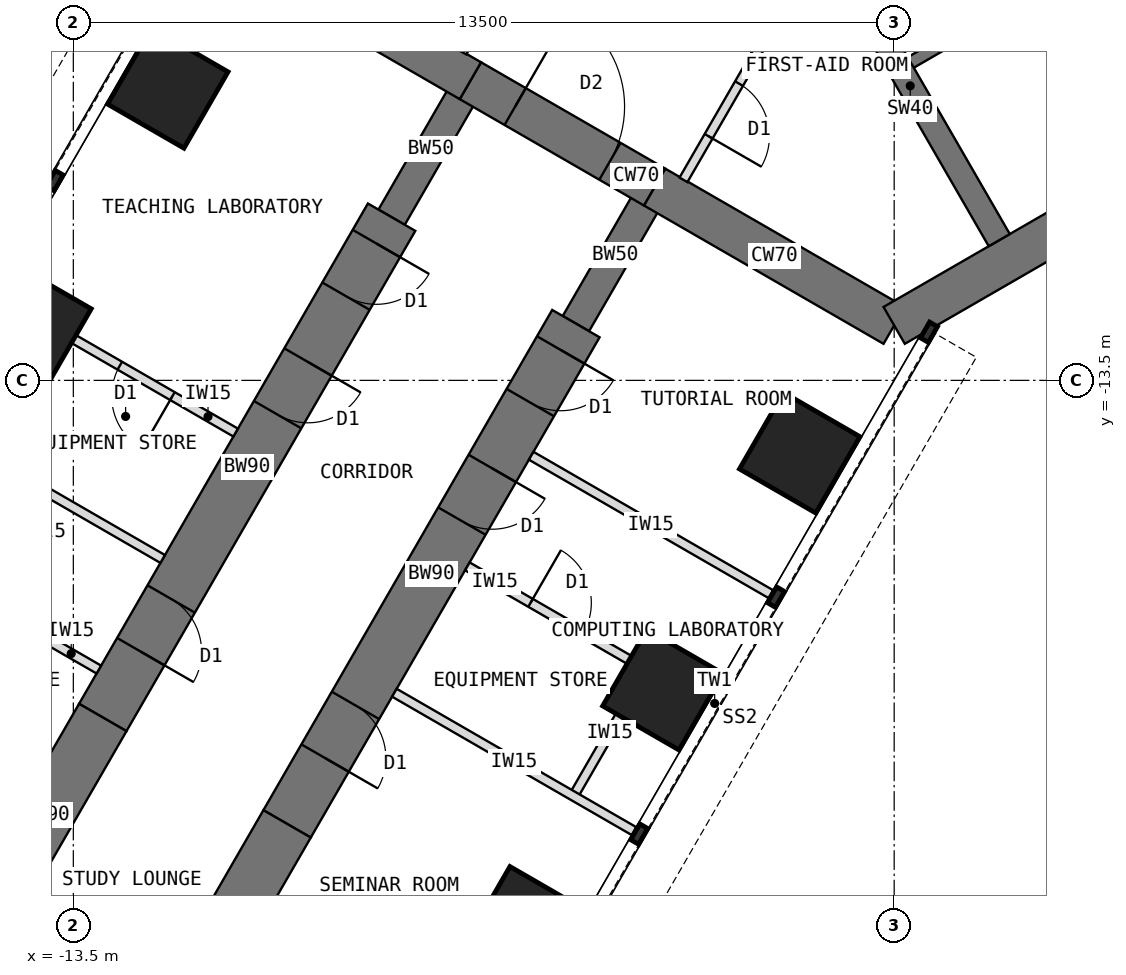
"""IFC4 building model, lengths in metres.
Left out: names, types, materials, properties, quantities, classifications, styles, units other than length and angle.
Written with IfcOpenShell. Run it as: python <this file> out.ifc"""

import sys

from ifc_helpers import new_model, si_unit, direction, frame, frame_2d, origin, origin_2d, place, context, subcontext, project, spatial, rectangle, extrude, element, fill, save


model = new_model("IFC4")
c1 = context("Model", 3, precision=1e-05, world=origin(), true_north=direction((0.0, 1.0)))
c2 = subcontext(c1, "Body", "Model", "MODEL_VIEW")
j1 = project(units=[si_unit("LENGTHUNIT", "METRE"), si_unit("PLANEANGLEUNIT", "RADIAN")], contexts=[c1])
p1 = place(None, origin())
s1 = spatial("IfcSite", under=j1, at=p1, CompositionType="ELEMENT")
p2 = place(p1, origin())
s2 = spatial("IfcBuilding", under=s1, at=p2, CompositionType="ELEMENT")
p3 = place(p2, frame((0.0, 0.0, 64.5)))
s3 = spatial("IfcBuildingStorey", under=s2, at=p3, CompositionType="ELEMENT", Elevation=64.5)
p4 = place(p3, frame((-10.908, -6.298, 0.0), z_axis=(0.0, 0.0, 1.0), x_axis=(0.866034513004, -0.499984222037, 0.0)))
e1 = element("IfcWall", 1, at=p4, inside=s3, PredefinedType="SHEAR", context=c2, shape_type="SweptSolid", body=[
    extrude(rectangle(XDim=4.548, YDim=0.7, at=frame_2d((2.274, 0.0))), origin(), (0.0, 0.0, 1.0), 4.0),
])
p5 = place(p3, frame((-6.97, -8.572, 0.0), z_axis=(0.0, 0.0, 1.0), x_axis=(0.866019471182, -0.500010275428, 0.0)))
e2 = element("IfcWall", 2, at=p5, inside=s3, PredefinedType="SHEAR", context=c2, shape_type="SweptSolid", body=[
    extrude(rectangle(XDim=3.5, YDim=0.7, at=frame_2d((1.75, 0.0))), origin(), (0.0, 0.0, 1.0), 4.0),
])
p6 = place(p5, frame((0.85, 0.0, 0.0)))
e3 = element("IfcOpeningElement", 3, at=p6, cuts=e2, PredefinedType="OPENING", context=c2, shape_type="SweptSolid", body=[
    extrude(rectangle(XDim=1.8, YDim=2.1, at=frame_2d((0.9, 1.05))), frame((0.0, 0.36, 0.0), z_axis=(0.0, -1.0, 0.0), x_axis=(1.0, 0.0, 0.0)), (0.0, 0.0, 1.0), 0.72),
])
p7 = place(p3, frame((-3.939, -10.322, 0.0), z_axis=(0.0, 0.0, 1.0), x_axis=(0.866011268655, -0.500024481964, 0.0)))
e4 = element("IfcWall", 4, at=p7, inside=s3, PredefinedType="SHEAR", context=c2, shape_type="SweptSolid", body=[
    extrude(rectangle(XDim=4.548, YDim=0.7, at=frame_2d((2.274, 0.0))), origin(), (0.0, 0.0, 1.0), 4.0),
])
p8 = place(p3, frame((0.0, -12.596, 0.0), z_axis=(0.0, 0.0, 1.0), x_axis=(0.866021940709, 0.500005998175, 0.0)))
e5 = element("IfcWall", 5, at=p8, inside=s3, PredefinedType="SHEAR", context=c2, shape_type="SweptSolid", body=[
    extrude(rectangle(XDim=12.596, YDim=0.7, at=frame_2d((6.298, 0.0))), origin(), (0.0, 0.0, 1.0), 4.0),
])
p9 = place(p3, frame((-3.939, -10.322, 0.0), z_axis=(0.0, 0.0, 1.0), x_axis=(-0.499918158782, -0.866072649678, 0.0)))
e6 = element("IfcWall", 6, at=p9, inside=s3, PredefinedType="SHEAR", context=c2, shape_type="SweptSolid", body=[
    extrude(rectangle(XDim=2.592, YDim=0.5, at=frame_2d((1.296, 0.0))), origin(), (0.0, 0.0, 1.0), 4.0),
])
p10 = place(p3, frame((-5.234, -12.566, 0.0), z_axis=(0.0, 0.0, 1.0), x_axis=(-0.499997557548, -0.86602681393, 0.0)))
e7 = element("IfcWall", 7, at=p10, inside=s3, PredefinedType="SHEAR", context=c2, shape_type="SweptSolid", body=[
    extrude(rectangle(XDim=9.5, YDim=0.9, at=frame_2d((4.75, 0.0))), origin(), (0.0, 0.0, 1.0), 4.0),
])
p11 = place(p10, frame((0.5, 0.0, 0.0)))
e8 = element("IfcOpeningElement", 8, at=p11, cuts=e7, PredefinedType="OPENING", context=c2, shape_type="SweptSolid", body=[
    extrude(rectangle(XDim=1.0, YDim=2.1, at=frame_2d((0.5, 1.05))), frame((0.0, 0.46, 0.0), z_axis=(0.0, -1.0, 0.0), x_axis=(1.0, 0.0, 0.0)), (0.0, 0.0, 1.0), 0.92),
])
p12 = place(p10, frame((2.75, 0.0, 0.0)))
e9 = element("IfcOpeningElement", 9, at=p12, cuts=e7, PredefinedType="OPENING", context=c2, shape_type="SweptSolid", body=[
    extrude(rectangle(XDim=1.0, YDim=2.1, at=frame_2d((0.5, 1.05))), frame((0.0, 0.46, 0.0), z_axis=(0.0, -1.0, 0.0), x_axis=(1.0, 0.0, 0.0)), (0.0, 0.0, 1.0), 0.92),
])
p13 = place(p10, frame((7.25, 0.0, 0.0)))
e10 = element("IfcOpeningElement", 10, at=p13, cuts=e7, PredefinedType="OPENING", context=c2, shape_type="SweptSolid", body=[
    extrude(rectangle(XDim=1.0, YDim=2.1, at=frame_2d((0.5, 1.05))), frame((0.0, 0.46, 0.0), z_axis=(0.0, -1.0, 0.0), x_axis=(1.0, 0.0, 0.0)), (0.0, 0.0, 1.0), 0.92),
])
p14 = place(p3, frame((-9.984, -20.794, 0.0), z_axis=(0.0, 0.0, 1.0), x_axis=(-0.500042316284, -0.866000971088, 0.0)))
e11 = element("IfcWall", 11, at=p14, inside=s3, PredefinedType="SHEAR", context=c2, shape_type="SweptSolid", body=[
    extrude(rectangle(XDim=3.7, YDim=0.9, at=frame_2d((1.85, 0.0))), origin(), (0.0, 0.0, 1.0), 4.0),
])
p15 = place(p3, frame((-6.97, -8.572, 0.0), z_axis=(0.0, 0.0, 1.0), x_axis=(-0.499988811324, -0.866031863473, 0.0)))
e12 = element("IfcWall", 12, at=p15, inside=s3, PredefinedType="SHEAR", context=c2, shape_type="SweptSolid", body=[
    extrude(rectangle(XDim=2.592, YDim=0.5, at=frame_2d((1.296, 0.0))), origin(), (0.0, 0.0, 1.0), 4.0),
])
p16 = place(p3, frame((-8.266, -10.816, 0.0), z_axis=(0.0, 0.0, 1.0), x_axis=(-0.499997557548, -0.86602681393, 0.0)))
e13 = element("IfcWall", 13, at=p16, inside=s3, PredefinedType="SHEAR", context=c2, shape_type="SweptSolid", body=[
    extrude(rectangle(XDim=9.5, YDim=0.9, at=frame_2d((4.75, 0.0))), origin(), (0.0, 0.0, 1.0), 4.0),
])
p17 = place(p16, frame((0.5, 0.0, 0.0)))
e14 = element("IfcOpeningElement", 14, at=p17, cuts=e13, PredefinedType="OPENING", context=c2, shape_type="SweptSolid", body=[
    extrude(rectangle(XDim=1.0, YDim=2.1, at=frame_2d((0.5, 1.05))), frame((0.0, 0.46, 0.0), z_axis=(0.0, -1.0, 0.0), x_axis=(1.0, 0.0, 0.0)), (0.0, 0.0, 1.0), 0.92),
])
p18 = place(p16, frame((2.75, 0.0, 0.0)))
e15 = element("IfcOpeningElement", 15, at=p18, cuts=e13, PredefinedType="OPENING", context=c2, shape_type="SweptSolid", body=[
    extrude(rectangle(XDim=1.0, YDim=2.1, at=frame_2d((0.5, 1.05))), frame((0.0, 0.46, 0.0), z_axis=(0.0, -1.0, 0.0), x_axis=(1.0, 0.0, 0.0)), (0.0, 0.0, 1.0), 0.92),
])
p19 = place(p16, frame((7.25, 0.0, 0.0)))
e16 = element("IfcOpeningElement", 16, at=p19, cuts=e13, PredefinedType="OPENING", context=c2, shape_type="SweptSolid", body=[
    extrude(rectangle(XDim=1.0, YDim=2.1, at=frame_2d((0.5, 1.05))), frame((0.0, 0.46, 0.0), z_axis=(0.0, -1.0, 0.0), x_axis=(1.0, 0.0, 0.0)), (0.0, 0.0, 1.0), 0.92),
])
p20 = place(p3, frame((-13.016, -19.044, 0.0), z_axis=(0.0, 0.0, 1.0), x_axis=(-0.499992827086, -0.866029545028, 0.0)))
e17 = element("IfcWall", 17, at=p20, inside=s3, PredefinedType="SHEAR", context=c2, shape_type="SweptSolid", body=[
    extrude(rectangle(XDim=3.7, YDim=0.9, at=frame_2d((1.85, 0.0))), origin(), (0.0, 0.0, 1.0), 4.0),
])
for number, where, z_axis, x_axis in (
    (18, (-1.554, -14.691, 0.0), (0.0, 0.0, 1.0), (0.5, 0.866, 0.0)),
    (19, (-11.946, -8.691, 0.0), (0.0, 0.0, 1.0), (0.5, 0.866, 0.0)),
    (20, (-3.804, -18.588, 0.0), (0.0, 0.0, 1.0), (0.5, 0.866, 0.0)),
    (21, (-14.196, -12.588, 0.0), (0.0, 0.0, 1.0), (0.5, 0.866, 0.0)),
    (22, (-6.054, -22.486, 0.0), (0.0, 0.0, 1.0), (0.5, 0.866, 0.0)),
):
    element("IfcColumn", number, at=place(p3, frame(where, z_axis=z_axis, x_axis=x_axis)), inside=s3, PredefinedType="COLUMN", context=c2, shape_type="SweptSolid", body=[
        extrude(rectangle(XDim=1.45, YDim=1.45, at=origin_2d()), origin(), (0.0, 0.0, 1.0), 4.0),
    ])
p21 = place(p3, frame((0.186, -8.322, 0.0), z_axis=(0.0, 0.0, 1.0), x_axis=(0.866026010844, 0.49999894854, 0.0)))
e23 = element("IfcWall", 23, at=p21, inside=s3, PredefinedType="SHEAR", context=c2, shape_type="SweptSolid", body=[
    extrude(rectangle(XDim=8.0, YDim=0.2, at=frame_2d((4.0, 0.0))), origin(), (0.0, 0.0, 1.0), 4.0),
])
p22 = place(p21, frame((6.7, 0.0, 0.0)))
e24 = element("IfcOpeningElement", 24, at=p22, cuts=e23, PredefinedType="OPENING", context=c2, shape_type="SweptSolid", body=[
    extrude(rectangle(XDim=1.1, YDim=2.1, at=frame_2d((0.55, 1.05))), frame((0.0, 0.11, 0.0), z_axis=(0.0, -1.0, 0.0), x_axis=(1.0, 0.0, 0.0)), (0.0, 0.0, 1.0), 0.22),
])
p23 = place(p3, frame((-1.201, -6.12, 0.0), z_axis=(0.0, 0.0, 1.0), x_axis=(0.500002627198, -0.866023886965, 0.0)))
e25 = element("IfcWall", 25, at=p23, inside=s3, PredefinedType="SHEAR", context=c2, shape_type="SweptSolid", body=[
    extrude(rectangle(XDim=5.858, YDim=0.4, at=frame_2d((2.929, 0.0))), origin(), (0.0, 0.0, 1.0), 4.0),
])
for number, where, z_axis, x_axis in (
    (26, (-5.97, -14.74, 0.0), (0.0, 0.0, 1.0), (0.866, -0.5, 0.0)),
    (27, (-8.22, -18.637, 0.0), (0.0, 0.0, 1.0), (0.866, -0.5, 0.0)),
):
    element("IfcWall", number, at=place(p3, frame(where, z_axis=z_axis, x_axis=x_axis)), inside=s3, PredefinedType="PARTITIONING", context=c2, shape_type="SweptSolid", body=[
        extrude(rectangle(XDim=4.55, YDim=0.15, at=frame_2d((2.275, 0.0))), origin(), (0.0, 0.0, 1.0), 3.8),
    ])
p24 = place(p3, frame((-4.075, -18.259, 0.0), z_axis=(0.0, 0.0, 1.0), x_axis=(-0.500001309137, -0.866024647952, 0.0)))
e28 = element("IfcWall", 28, at=p24, inside=s3, PredefinedType="PARTITIONING", context=c2, shape_type="SweptSolid", body=[
    extrude(rectangle(XDim=2.4, YDim=0.15, at=frame_2d((1.2, 0.0))), origin(), (0.0, 0.0, 1.0), 3.8),
])
p25 = place(p3, frame((-7.02, -16.559, 0.0), z_axis=(0.0, 0.0, 1.0), x_axis=(0.866038511948, -0.499977295307, 0.0)))
e29 = element("IfcWall", 29, at=p25, inside=s3, PredefinedType="PARTITIONING", context=c2, shape_type="SweptSolid", body=[
    extrude(rectangle(XDim=3.4, YDim=0.15, at=frame_2d((1.7, 0.0))), origin(), (0.0, 0.0, 1.0), 3.8),
])
p26 = place(p25, frame((1.2, 0.0, 0.0)))
e30 = element("IfcOpeningElement", 30, at=p26, cuts=e29, PredefinedType="OPENING", context=c2, shape_type="SweptSolid", body=[
    extrude(rectangle(XDim=1.0, YDim=2.1, at=frame_2d((0.5, 1.05))), frame((0.0, 0.085, 0.0), z_axis=(0.0, -1.0, 0.0), x_axis=(1.0, 0.0, 0.0)), (0.0, 0.0, 1.0), 0.17),
])
p27 = place(p3, frame((-12.03, -16.437, 0.0), z_axis=(0.0, 0.0, 1.0), x_axis=(-0.866035472144, 0.499982560684, 0.0)))
e31 = element("IfcWall", 31, at=p27, inside=s3, PredefinedType="PARTITIONING", context=c2, shape_type="SweptSolid", body=[
    extrude(rectangle(XDim=4.55, YDim=0.15, at=frame_2d((2.275, 0.0))), origin(), (0.0, 0.0, 1.0), 3.8),
])
p28 = place(p3, frame((-13.775, -12.658, 0.0), z_axis=(0.0, 0.0, 1.0), x_axis=(-0.500033551112, -0.866006032174, 0.0)))
e32 = element("IfcWall", 32, at=p28, inside=s3, PredefinedType="PARTITIONING", context=c2, shape_type="SweptSolid", body=[
    extrude(rectangle(XDim=2.4, YDim=0.15, at=frame_2d((1.2, 0.0))), origin(), (0.0, 0.0, 1.0), 3.8),
])
p29 = place(p3, frame((-10.83, -14.359, 0.0), z_axis=(0.0, 0.0, 1.0), x_axis=(-0.865989465428, 0.500062241894, 0.0)))
e33 = element("IfcWall", 33, at=p29, inside=s3, PredefinedType="PARTITIONING", context=c2, shape_type="SweptSolid", body=[
    extrude(rectangle(XDim=3.4, YDim=0.15, at=frame_2d((1.7, 0.0))), origin(), (0.0, 0.0, 1.0), 3.8),
])
p30 = place(p29, frame((1.2, 0.0, 0.0)))
e34 = element("IfcOpeningElement", 34, at=p30, cuts=e33, PredefinedType="OPENING", context=c2, shape_type="SweptSolid", body=[
    extrude(rectangle(XDim=1.0, YDim=2.1, at=frame_2d((0.5, 1.05))), frame((0.0, 0.085, 0.0), z_axis=(0.0, -1.0, 0.0), x_axis=(1.0, 0.0, 0.0)), (0.0, 0.0, 1.0), 0.17),
])
p31 = place(p3, frame((-13.08, -18.256, 0.0), z_axis=(0.0, 0.0, 1.0), x_axis=(-0.866020560687, 0.500008388397, 0.0)))
e35 = element("IfcWall", 35, at=p31, inside=s3, PredefinedType="PARTITIONING", context=c2, shape_type="SweptSolid", body=[
    extrude(rectangle(XDim=3.4, YDim=0.15, at=frame_2d((1.7, 0.0))), origin(), (0.0, 0.0, 1.0), 3.8),
])
p32 = place(p31, frame((1.2, 0.0, 0.0)))
e36 = element("IfcOpeningElement", 36, at=p32, cuts=e35, PredefinedType="OPENING", context=c2, shape_type="SweptSolid", body=[
    extrude(rectangle(XDim=1.0, YDim=2.1, at=frame_2d((0.5, 1.05))), frame((0.0, 0.085, 0.0), z_axis=(0.0, -1.0, 0.0), x_axis=(1.0, 0.0, 0.0)), (0.0, 0.0, 1.0), 0.17),
])
p33 = place(p3, frame((-1.253, -6.37, 0.0), z_axis=(0.0, 0.0, 1.0), x_axis=(-0.500007369519, -0.866021148949, 0.0)))
e37 = element("IfcWall", 37, at=p33, inside=s3, PredefinedType="PARTITIONING", context=c2, shape_type="SweptSolid", body=[
    extrude(rectangle(XDim=4.426, YDim=0.15, at=frame_2d((2.213, 0.0))), origin(), (0.0, 0.0, 1.0), 3.8),
])
p34 = place(p33, frame((2.598, 0.0, 0.0)))
e38 = element("IfcOpeningElement", 38, at=p34, cuts=e37, PredefinedType="OPENING", context=c2, shape_type="SweptSolid", body=[
    extrude(rectangle(XDim=1.0, YDim=2.1, at=frame_2d((0.5, 1.05))), frame((0.0, 0.085, 0.0), z_axis=(0.0, -1.0, 0.0), x_axis=(1.0, 0.0, 0.0)), (0.0, 0.0, 1.0), 0.17),
])
p35 = place(p3, frame((-7.103, -8.103, 0.0), z_axis=(0.0, 0.0, 1.0), x_axis=(0.500007369519, 0.866021148949, 0.0)))
e39 = element("IfcWall", 39, at=p35, inside=s3, PredefinedType="PARTITIONING", context=c2, shape_type="SweptSolid", body=[
    extrude(rectangle(XDim=4.426, YDim=0.15, at=frame_2d((2.213, 0.0))), origin(), (0.0, 0.0, 1.0), 3.8),
])
p36 = place(p35, frame((0.828, 0.0, 0.0)))
e40 = element("IfcOpeningElement", 40, at=p36, cuts=e39, PredefinedType="OPENING", context=c2, shape_type="SweptSolid", body=[
    extrude(rectangle(XDim=1.0, YDim=2.1, at=frame_2d((0.5, 1.05))), frame((0.0, 0.085, 0.0), z_axis=(0.0, -1.0, 0.0), x_axis=(1.0, 0.0, 0.0)), (0.0, 0.0, 1.0), 0.17),
])
p37 = place(p6, origin())
e41 = element("IfcDoor", 41, at=p37, inside=s3, OperationType="DOUBLE_DOOR_DOUBLE_SWING", PredefinedType="DOOR", context=c2, shape_type="SweptSolid", body=[
    extrude(rectangle(XDim=1.72, YDim=2.06, at=frame_2d((0.9, 1.03))), frame((0.0, 0.025, 0.0), z_axis=(0.0, -1.0, 0.0), x_axis=(1.0, 0.0, 0.0)), (0.0, 0.0, 1.0), 0.05),
    extrude(rectangle(XDim=0.04, YDim=2.1, at=frame_2d((0.02, 1.05))), frame((0.0, 0.35, 0.0), z_axis=(0.0, -1.0, 0.0), x_axis=(1.0, 0.0, 0.0)), (0.0, 0.0, 1.0), 0.699),
    extrude(rectangle(XDim=0.04, YDim=2.1, at=frame_2d((1.78, 1.05))), frame((0.0, 0.35, 0.0), z_axis=(0.0, -1.0, 0.0), x_axis=(1.0, 0.0, 0.0)), (0.0, 0.0, 1.0), 0.699),
    extrude(rectangle(XDim=1.72, YDim=0.04, at=frame_2d((0.9, 2.08))), frame((0.0, 0.35, 0.0), z_axis=(0.0, -1.0, 0.0), x_axis=(1.0, 0.0, 0.0)), (0.0, 0.0, 1.0), 0.699),
])
fill(e3, e41)
p38 = place(p26, origin())
e42 = element("IfcDoor", 42, at=p38, inside=s3, OperationType="SINGLE_SWING_LEFT", PredefinedType="DOOR", context=c2, shape_type="SweptSolid", body=[
    extrude(rectangle(XDim=1.0, YDim=2.1, at=frame_2d((0.5, 1.05))), frame((0.0, 0.025, 0.0), z_axis=(0.0, -1.0, 0.0), x_axis=(1.0, 0.0, 0.0)), (0.0, 0.0, 1.0), 0.05),
])
fill(e30, e42)
p39 = place(p30, origin())
e43 = element("IfcDoor", 43, at=p39, inside=s3, OperationType="SINGLE_SWING_LEFT", PredefinedType="DOOR", context=c2, shape_type="SweptSolid", body=[
    extrude(rectangle(XDim=1.0, YDim=2.1, at=frame_2d((0.5, 1.05))), frame((0.0, 0.025, 0.0), z_axis=(0.0, -1.0, 0.0), x_axis=(1.0, 0.0, 0.0)), (0.0, 0.0, 1.0), 0.05),
])
fill(e34, e43)
p40 = place(p34, origin())
e44 = element("IfcDoor", 44, at=p40, inside=s3, OperationType="SINGLE_SWING_RIGHT", PredefinedType="DOOR", context=c2, shape_type="SweptSolid", body=[
    extrude(rectangle(XDim=1.0, YDim=2.1, at=frame_2d((0.5, 1.05))), frame((0.0, 0.025, 0.0), z_axis=(0.0, -1.0, 0.0), x_axis=(1.0, 0.0, 0.0)), (0.0, 0.0, 1.0), 0.05),
])
fill(e38, e44)
p41 = place(p11, origin())
e45 = element("IfcDoor", 45, at=p41, inside=s3, OperationType="SINGLE_SWING_LEFT", PredefinedType="DOOR", context=c2, shape_type="SweptSolid", body=[
    extrude(rectangle(XDim=0.92, YDim=2.06, at=frame_2d((0.5, 1.03))), frame((0.0, 0.025, 0.0), z_axis=(0.0, -1.0, 0.0), x_axis=(1.0, 0.0, 0.0)), (0.0, 0.0, 1.0), 0.05),
    extrude(rectangle(XDim=0.04, YDim=2.1, at=frame_2d((0.02, 1.05))), frame((0.0, 0.45, 0.0), z_axis=(0.0, -1.0, 0.0), x_axis=(1.0, 0.0, 0.0)), (0.0, 0.0, 1.0), 0.899),
    extrude(rectangle(XDim=0.04, YDim=2.1, at=frame_2d((0.98, 1.05))), frame((0.0, 0.45, 0.0), z_axis=(0.0, -1.0, 0.0), x_axis=(1.0, 0.0, 0.0)), (0.0, 0.0, 1.0), 0.899),
    extrude(rectangle(XDim=0.92, YDim=0.04, at=frame_2d((0.5, 2.08))), frame((0.0, 0.45, 0.0), z_axis=(0.0, -1.0, 0.0), x_axis=(1.0, 0.0, 0.0)), (0.0, 0.0, 1.0), 0.899),
])
fill(e8, e45)
p42 = place(p12, origin())
e46 = element("IfcDoor", 46, at=p42, inside=s3, OperationType="SINGLE_SWING_LEFT", PredefinedType="DOOR", context=c2, shape_type="SweptSolid", body=[
    extrude(rectangle(XDim=0.92, YDim=2.06, at=frame_2d((0.5, 1.03))), frame((0.0, 0.025, 0.0), z_axis=(0.0, -1.0, 0.0), x_axis=(1.0, 0.0, 0.0)), (0.0, 0.0, 1.0), 0.05),
    extrude(rectangle(XDim=0.04, YDim=2.1, at=frame_2d((0.02, 1.05))), frame((0.0, 0.45, 0.0), z_axis=(0.0, -1.0, 0.0), x_axis=(1.0, 0.0, 0.0)), (0.0, 0.0, 1.0), 0.899),
    extrude(rectangle(XDim=0.04, YDim=2.1, at=frame_2d((0.98, 1.05))), frame((0.0, 0.45, 0.0), z_axis=(0.0, -1.0, 0.0), x_axis=(1.0, 0.0, 0.0)), (0.0, 0.0, 1.0), 0.899),
    extrude(rectangle(XDim=0.92, YDim=0.04, at=frame_2d((0.5, 2.08))), frame((0.0, 0.45, 0.0), z_axis=(0.0, -1.0, 0.0), x_axis=(1.0, 0.0, 0.0)), (0.0, 0.0, 1.0), 0.899),
])
fill(e9, e46)
p43 = place(p13, origin())
e47 = element("IfcDoor", 47, at=p43, inside=s3, OperationType="SINGLE_SWING_RIGHT", PredefinedType="DOOR", context=c2, shape_type="SweptSolid", body=[
    extrude(rectangle(XDim=0.92, YDim=2.06, at=frame_2d((0.5, 1.03))), frame((0.0, 0.025, 0.0), z_axis=(0.0, -1.0, 0.0), x_axis=(1.0, 0.0, 0.0)), (0.0, 0.0, 1.0), 0.05),
    extrude(rectangle(XDim=0.04, YDim=2.1, at=frame_2d((0.02, 1.05))), frame((0.0, 0.45, 0.0), z_axis=(0.0, -1.0, 0.0), x_axis=(1.0, 0.0, 0.0)), (0.0, 0.0, 1.0), 0.899),
    extrude(rectangle(XDim=0.04, YDim=2.1, at=frame_2d((0.98, 1.05))), frame((0.0, 0.45, 0.0), z_axis=(0.0, -1.0, 0.0), x_axis=(1.0, 0.0, 0.0)), (0.0, 0.0, 1.0), 0.899),
    extrude(rectangle(XDim=0.92, YDim=0.04, at=frame_2d((0.5, 2.08))), frame((0.0, 0.45, 0.0), z_axis=(0.0, -1.0, 0.0), x_axis=(1.0, 0.0, 0.0)), (0.0, 0.0, 1.0), 0.899),
])
fill(e10, e47)
p44 = place(p17, origin())
e48 = element("IfcDoor", 48, at=p44, inside=s3, OperationType="SINGLE_SWING_LEFT", PredefinedType="DOOR", context=c2, shape_type="SweptSolid", body=[
    extrude(rectangle(XDim=0.92, YDim=2.06, at=frame_2d((0.5, 1.03))), frame((0.0, 0.025, 0.0), z_axis=(0.0, -1.0, 0.0), x_axis=(1.0, 0.0, 0.0)), (0.0, 0.0, 1.0), 0.05),
    extrude(rectangle(XDim=0.04, YDim=2.1, at=frame_2d((0.02, 1.05))), frame((0.0, 0.45, 0.0), z_axis=(0.0, -1.0, 0.0), x_axis=(1.0, 0.0, 0.0)), (0.0, 0.0, 1.0), 0.899),
    extrude(rectangle(XDim=0.04, YDim=2.1, at=frame_2d((0.98, 1.05))), frame((0.0, 0.45, 0.0), z_axis=(0.0, -1.0, 0.0), x_axis=(1.0, 0.0, 0.0)), (0.0, 0.0, 1.0), 0.899),
    extrude(rectangle(XDim=0.92, YDim=0.04, at=frame_2d((0.5, 2.08))), frame((0.0, 0.45, 0.0), z_axis=(0.0, -1.0, 0.0), x_axis=(1.0, 0.0, 0.0)), (0.0, 0.0, 1.0), 0.899),
])
fill(e14, e48)
p45 = place(p18, origin())
e49 = element("IfcDoor", 49, at=p45, inside=s3, OperationType="SINGLE_SWING_LEFT", PredefinedType="DOOR", context=c2, shape_type="SweptSolid", body=[
    extrude(rectangle(XDim=0.92, YDim=2.06, at=frame_2d((0.5, 1.03))), frame((0.0, 0.025, 0.0), z_axis=(0.0, -1.0, 0.0), x_axis=(1.0, 0.0, 0.0)), (0.0, 0.0, 1.0), 0.05),
    extrude(rectangle(XDim=0.04, YDim=2.1, at=frame_2d((0.02, 1.05))), frame((0.0, 0.45, 0.0), z_axis=(0.0, -1.0, 0.0), x_axis=(1.0, 0.0, 0.0)), (0.0, 0.0, 1.0), 0.899),
    extrude(rectangle(XDim=0.04, YDim=2.1, at=frame_2d((0.98, 1.05))), frame((0.0, 0.45, 0.0), z_axis=(0.0, -1.0, 0.0), x_axis=(1.0, 0.0, 0.0)), (0.0, 0.0, 1.0), 0.899),
    extrude(rectangle(XDim=0.92, YDim=0.04, at=frame_2d((0.5, 2.08))), frame((0.0, 0.45, 0.0), z_axis=(0.0, -1.0, 0.0), x_axis=(1.0, 0.0, 0.0)), (0.0, 0.0, 1.0), 0.899),
])
fill(e15, e49)
p46 = place(p19, origin())
e50 = element("IfcDoor", 50, at=p46, inside=s3, OperationType="SINGLE_SWING_RIGHT", PredefinedType="DOOR", context=c2, shape_type="SweptSolid", body=[
    extrude(rectangle(XDim=0.92, YDim=2.06, at=frame_2d((0.5, 1.03))), frame((0.0, 0.025, 0.0), z_axis=(0.0, -1.0, 0.0), x_axis=(1.0, 0.0, 0.0)), (0.0, 0.0, 1.0), 0.05),
    extrude(rectangle(XDim=0.04, YDim=2.1, at=frame_2d((0.02, 1.05))), frame((0.0, 0.45, 0.0), z_axis=(0.0, -1.0, 0.0), x_axis=(1.0, 0.0, 0.0)), (0.0, 0.0, 1.0), 0.899),
    extrude(rectangle(XDim=0.04, YDim=2.1, at=frame_2d((0.98, 1.05))), frame((0.0, 0.45, 0.0), z_axis=(0.0, -1.0, 0.0), x_axis=(1.0, 0.0, 0.0)), (0.0, 0.0, 1.0), 0.899),
    extrude(rectangle(XDim=0.92, YDim=0.04, at=frame_2d((0.5, 2.08))), frame((0.0, 0.45, 0.0), z_axis=(0.0, -1.0, 0.0), x_axis=(1.0, 0.0, 0.0)), (0.0, 0.0, 1.0), 0.899),
])
fill(e16, e50)
save(model, sys.argv[1])
